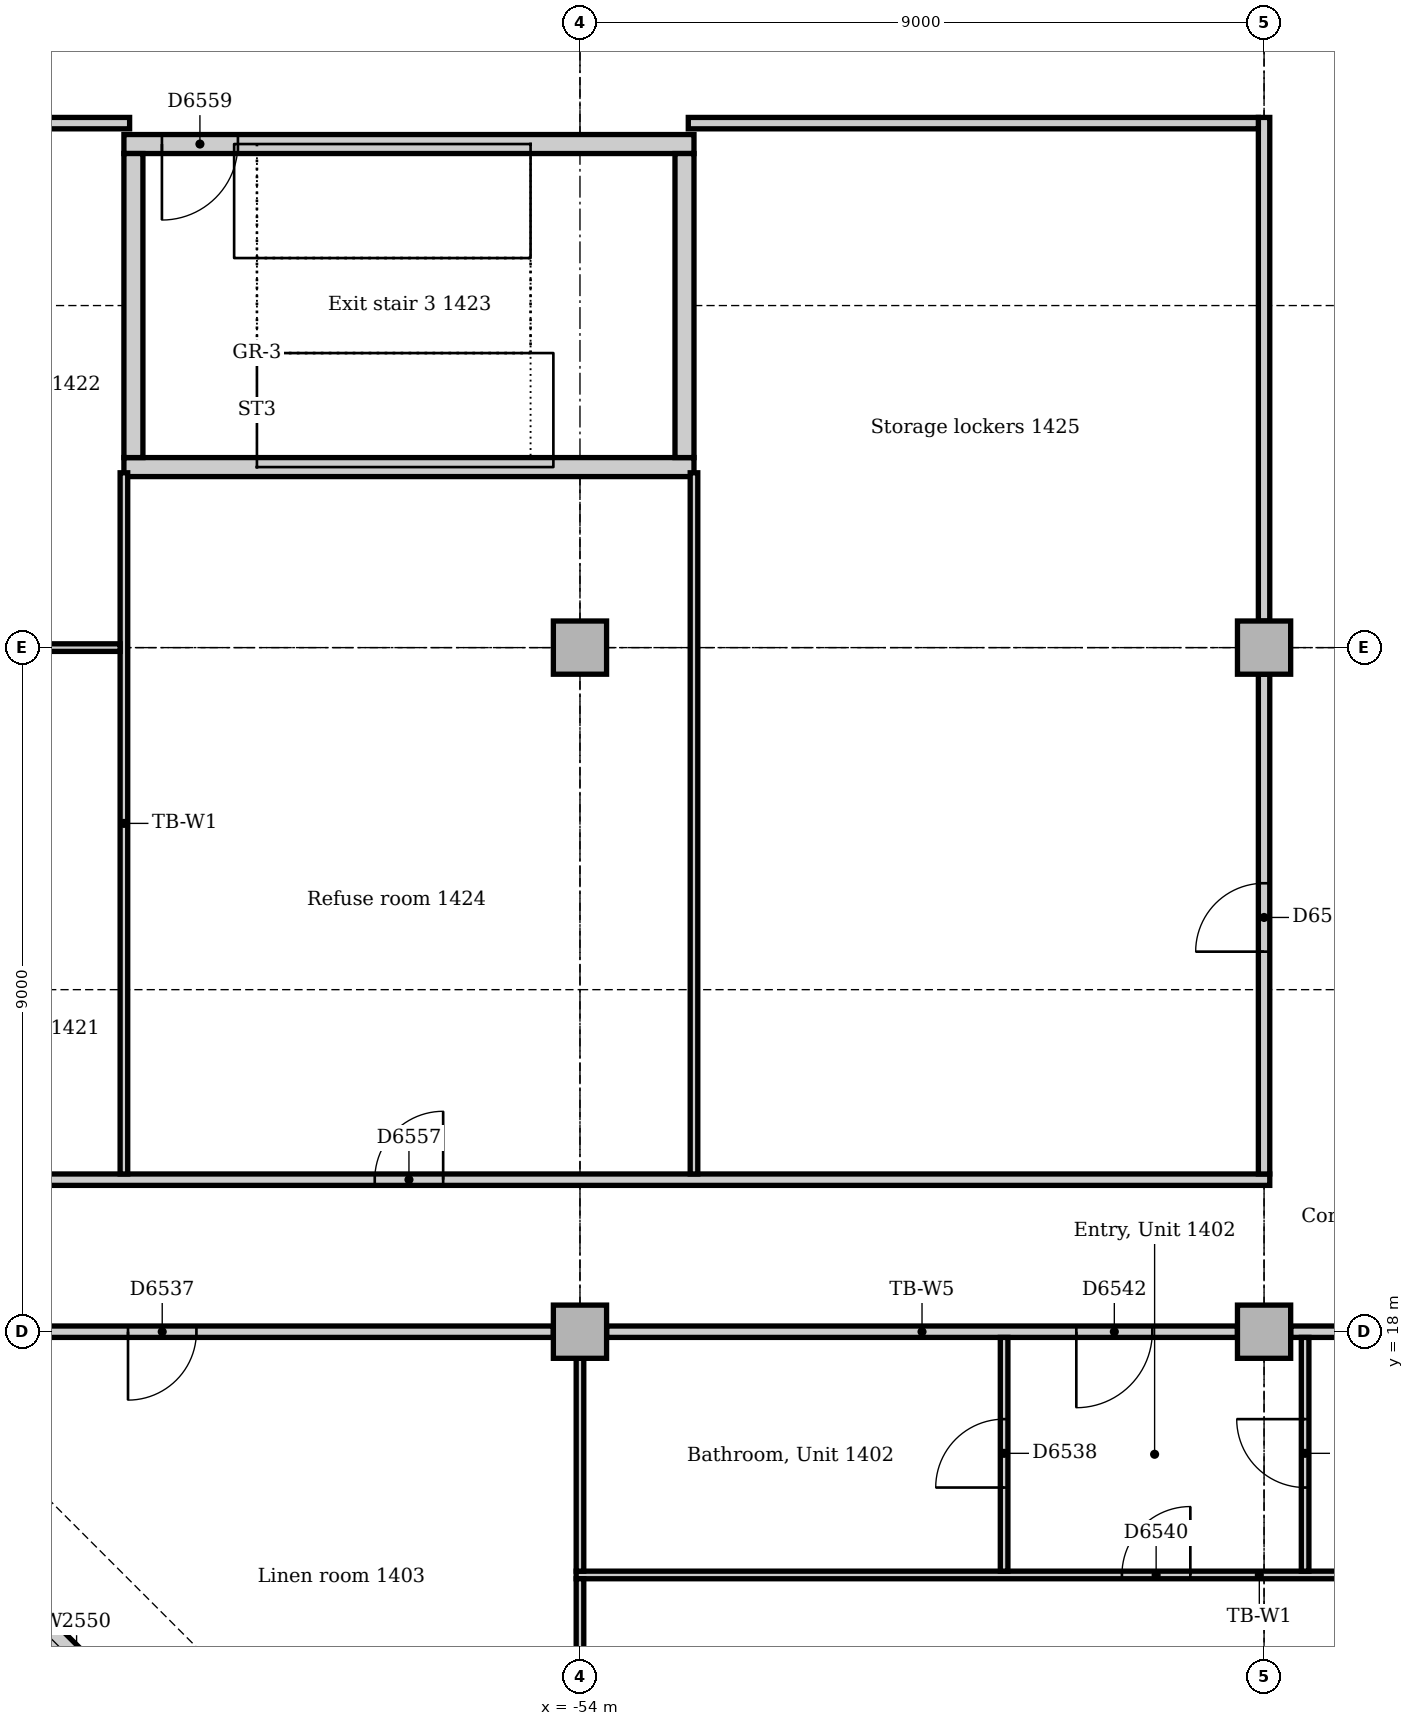
"""IFC4 building model, lengths in metres.
Left out: names, types, materials, properties, quantities, classifications, styles, units other than length and angle.
Written with IfcOpenShell. Run it as: python <this file> out.ifc"""

import sys

from ifc_helpers import new_model, si_unit, direction, frame, frame_2d, origin, origin_2d, place, context, subcontext, project, spatial, rectangle, extrude, element, fill, save


model = new_model("IFC4")
c1 = context("Model", 3, precision=1e-05, world=origin(), true_north=direction((0.0, 1.0)))
c2 = subcontext(c1, "Body", "Model", "MODEL_VIEW")
j1 = project(units=[si_unit("LENGTHUNIT", "METRE"), si_unit("PLANEANGLEUNIT", "RADIAN")], contexts=[c1])
p1 = place(None, origin())
s1 = spatial("IfcSite", under=j1, at=p1, CompositionType="ELEMENT")
p2 = place(p1, origin())
s2 = spatial("IfcBuilding", under=s1, at=p2, CompositionType="ELEMENT")
p3 = place(p2, frame((0.0, 0.0, 63.0)))
s3 = spatial("IfcBuildingStorey", under=s2, at=p3, CompositionType="ELEMENT", Elevation=63.0)
p4 = place(p3, frame((-60.0, 29.375, 0.0), z_axis=(0.0, 0.0, 1.0), x_axis=(1.0, 0.0, 0.0)))
e1 = element("IfcWall", 1, at=p4, inside=s3, PredefinedType="SOLIDWALL", context=c2, shape_type="SweptSolid", body=[
    extrude(rectangle(XDim=7.5, YDim=0.25, at=frame_2d((3.75, 0.0))), origin(), (0.0, 0.0, 1.0), 4.0),
])
p5 = place(p3, frame((-52.5, 33.625, 0.0), z_axis=(0.0, 0.0, 1.0), x_axis=(-1.0, 0.0, 0.0)))
e2 = element("IfcWall", 2, at=p5, inside=s3, PredefinedType="SOLIDWALL", context=c2, shape_type="SweptSolid", body=[
    extrude(rectangle(XDim=7.5, YDim=0.25, at=frame_2d((3.75, 0.0))), origin(), (0.0, 0.0, 1.0), 4.0),
])
p6 = place(p5, frame((6.0, 0.0, 0.0)))
e3 = element("IfcOpeningElement", 3, at=p6, cuts=e2, PredefinedType="OPENING", context=c2, shape_type="SweptSolid", body=[
    extrude(rectangle(XDim=1.0, YDim=2.1, at=frame_2d((0.5, 1.05))), frame((0.0, 0.135, 0.0), z_axis=(0.0, -1.0, 0.0), x_axis=(1.0, 0.0, 0.0)), (0.0, 0.0, 1.0), 0.27),
])
for number, where, z_axis, x_axis in (
    (4, (-52.625, 29.5, 0.0), (0.0, 0.0, 1.0), (0.0, 1.0, 0.0)),
    (5, (-59.875, 33.5, 0.0), (0.0, 0.0, 1.0), (0.0, -1.0, 0.0)),
):
    element("IfcWall", number, at=place(p3, frame(where, z_axis=z_axis, x_axis=x_axis)), inside=s3, PredefinedType="SOLIDWALL", context=c2, shape_type="SweptSolid", body=[
        extrude(rectangle(XDim=4.0, YDim=0.25, at=frame_2d((2.0, 0.0))), origin(), (0.0, 0.0, 1.0), 4.0),
    ])
for number, where, z_axis, x_axis in (
    (6, (-54.0, 18.0, 0.0), (0.0, 0.0, 1.0), (1.0, 0.0, 0.0)),
    (7, (-54.0, 27.0, 0.0), (0.0, 0.0, 1.0), (1.0, 0.0, 0.0)),
    (8, (-45.0, 18.0, 0.0), (0.0, 0.0, 1.0), (1.0, 0.0, 0.0)),
    (9, (-45.0, 27.0, 0.0), (0.0, 0.0, 1.0), (1.0, 0.0, 0.0)),
):
    element("IfcColumn", number, at=place(p3, frame(where, z_axis=z_axis, x_axis=x_axis)), inside=s3, PredefinedType="COLUMN", context=c2, shape_type="SweptSolid", body=[
        extrude(rectangle(XDim=0.7, YDim=0.7, at=origin_2d()), origin(), (0.0, 0.0, 1.0), 3.85),
    ])
p7 = place(p3, frame((-64.244, 17.249, 0.0), z_axis=(0.0, 0.0, 1.0), x_axis=(0.707106781187, -0.707106781187, 0.0)))
e10 = element("IfcWall", 10, at=p7, inside=s3, PredefinedType="STANDARD", context=c2, shape_type="SweptSolid", body=[
    extrude(rectangle(XDim=10.243, YDim=0.36, at=frame_2d((5.121, 0.0))), origin(), (0.0, 0.0, 1.0), 3.85),
])
p8 = place(p7, frame((3.471, 0.0, 0.9)))
e11 = element("IfcOpeningElement", 11, at=p8, cuts=e10, PredefinedType="OPENING", context=c2, shape_type="SweptSolid", body=[
    extrude(rectangle(XDim=3.3, YDim=1.6, at=frame_2d((1.65, 0.8))), frame((0.0, 0.19, 0.0), z_axis=(0.0, -1.0, 0.0), x_axis=(1.0, 0.0, 0.0)), (0.0, 0.0, 1.0), 0.38),
])
p9 = place(p3, frame((-44.65, 18.0, 0.0), z_axis=(0.0, 0.0, 1.0), x_axis=(1.0, 0.0, 0.0)))
e12 = element("IfcWall", 12, at=p9, inside=s3, PredefinedType="PARTITIONING", context=c2, shape_type="SweptSolid", body=[
    extrude(rectangle(XDim=8.3, YDim=0.15, at=frame_2d((4.15, 0.0))), origin(), (0.0, 0.0, 1.0), 3.158),
])
p10 = place(p3, frame((-53.65, 18.0, 0.0), z_axis=(0.0, 0.0, 1.0), x_axis=(1.0, 0.0, 0.0)))
e13 = element("IfcWall", 13, at=p10, inside=s3, PredefinedType="PARTITIONING", context=c2, shape_type="SweptSolid", body=[
    extrude(rectangle(XDim=8.3, YDim=0.15, at=frame_2d((4.15, 0.0))), origin(), (0.0, 0.0, 1.0), 3.158),
])
p11 = place(p10, frame((6.18, 0.0, 0.0)))
e14 = element("IfcOpeningElement", 14, at=p11, cuts=e13, PredefinedType="OPENING", context=c2, shape_type="SweptSolid", body=[
    extrude(rectangle(XDim=1.0, YDim=2.1, at=frame_2d((0.5, 1.05))), frame((0.0, 0.085, 0.0), z_axis=(0.0, -1.0, 0.0), x_axis=(1.0, 0.0, 0.0)), (0.0, 0.0, 1.0), 0.17),
])
p12 = place(p3, frame((-64.596, 18.0, 0.0), z_axis=(0.0, 0.0, 1.0), x_axis=(1.0, 0.0, 0.0)))
e15 = element("IfcWall", 15, at=p12, inside=s3, PredefinedType="PARTITIONING", context=c2, shape_type="SweptSolid", body=[
    extrude(rectangle(XDim=10.246, YDim=0.15, at=frame_2d((5.123, 0.0))), origin(), (0.0, 0.0, 1.0), 3.158),
])
p13 = place(p12, frame((4.65, 0.0, 0.0)))
e16 = element("IfcOpeningElement", 16, at=p13, cuts=e15, PredefinedType="OPENING", context=c2, shape_type="SweptSolid", body=[
    extrude(rectangle(XDim=0.9, YDim=2.1, at=frame_2d((0.45, 1.05))), frame((0.0, 0.085, 0.0), z_axis=(0.0, -1.0, 0.0), x_axis=(1.0, 0.0, 0.0)), (0.0, 0.0, 1.0), 0.17),
])
p14 = place(p3, frame((-64.89, 20.0, 0.0), z_axis=(0.0, 0.0, 1.0), x_axis=(1.0, 0.0, 0.0)))
e17 = element("IfcWall", 17, at=p14, inside=s3, PredefinedType="PARTITIONING", context=c2, shape_type="SweptSolid", body=[
    extrude(rectangle(XDim=19.965, YDim=0.15, at=frame_2d((9.982, 0.0))), origin(), (0.0, 0.0, 1.0), 3.85),
])
p15 = place(p14, frame((2.05, 0.0, 0.0)))
e18 = element("IfcOpeningElement", 18, at=p15, cuts=e17, PredefinedType="OPENING", context=c2, shape_type="SweptSolid", body=[
    extrude(rectangle(XDim=0.9, YDim=2.1, at=frame_2d((0.45, 1.05))), frame((0.0, 0.085, 0.0), z_axis=(0.0, -1.0, 0.0), x_axis=(1.0, 0.0, 0.0)), (0.0, 0.0, 1.0), 0.17),
])
p16 = place(p14, frame((8.19, 0.0, 0.0)))
e19 = element("IfcOpeningElement", 19, at=p16, cuts=e17, PredefinedType="OPENING", context=c2, shape_type="SweptSolid", body=[
    extrude(rectangle(XDim=0.9, YDim=2.1, at=frame_2d((0.45, 1.05))), frame((0.0, 0.085, 0.0), z_axis=(0.0, -1.0, 0.0), x_axis=(1.0, 0.0, 0.0)), (0.0, 0.0, 1.0), 0.17),
])
p17 = place(p3, frame((-45.0, 20.075, 0.0), z_axis=(0.0, 0.0, 1.0), x_axis=(0.0, 1.0, 0.0)))
e20 = element("IfcWall", 20, at=p17, inside=s3, PredefinedType="PARTITIONING", context=c2, shape_type="SweptSolid", body=[
    extrude(rectangle(XDim=6.575, YDim=0.15, at=frame_2d((3.288, 0.0))), origin(), (0.0, 0.0, 1.0), 3.256),
])
p18 = place(p17, frame((2.925, 0.0, 0.0)))
e21 = element("IfcOpeningElement", 21, at=p18, cuts=e20, PredefinedType="OPENING", context=c2, shape_type="SweptSolid", body=[
    extrude(rectangle(XDim=0.9, YDim=2.1, at=frame_2d((0.45, 1.05))), frame((0.0, 0.085, 0.0), z_axis=(0.0, -1.0, 0.0), x_axis=(1.0, 0.0, 0.0)), (0.0, 0.0, 1.0), 0.17),
])
p19 = place(p3, frame((-45.0, 27.35, 0.0), z_axis=(0.0, 0.0, 1.0), x_axis=(0.0, 1.0, 0.0)))
e22 = element("IfcWall", 22, at=p19, inside=s3, PredefinedType="PARTITIONING", context=c2, shape_type="SweptSolid", body=[
    extrude(rectangle(XDim=6.625, YDim=0.15, at=frame_2d((3.312, 0.0))), origin(), (0.0, 0.0, 1.0), 3.256),
])
p20 = place(p3, frame((-52.575, 33.9, 0.0), z_axis=(0.0, 0.0, 1.0), x_axis=(1.0, 0.0, 0.0)))
e23 = element("IfcWall", 23, at=p20, inside=s3, PredefinedType="PARTITIONING", context=c2, shape_type="SweptSolid", body=[
    extrude(rectangle(XDim=7.5, YDim=0.15, at=frame_2d((3.75, 0.0))), origin(), (0.0, 0.0, 1.0), 3.85),
])
p21 = place(p3, frame((-64.89, 33.9, 0.0), z_axis=(0.0, 0.0, 1.0), x_axis=(1.0, 0.0, 0.0)))
e24 = element("IfcWall", 24, at=p21, inside=s3, PredefinedType="PARTITIONING", context=c2, shape_type="SweptSolid", body=[
    extrude(rectangle(XDim=4.965, YDim=0.15, at=frame_2d((2.482, 0.0))), origin(), (0.0, 0.0, 1.0), 3.85),
])
p22 = place(p21, frame((2.05, 0.0, 0.0)))
e25 = element("IfcOpeningElement", 25, at=p22, cuts=e24, PredefinedType="OPENING", context=c2, shape_type="SweptSolid", body=[
    extrude(rectangle(XDim=0.9, YDim=2.1, at=frame_2d((0.45, 1.05))), frame((0.0, 0.085, 0.0), z_axis=(0.0, -1.0, 0.0), x_axis=(1.0, 0.0, 0.0)), (0.0, 0.0, 1.0), 0.17),
])
p23 = place(p3, frame((-54.05, 14.8, 0.0), z_axis=(0.0, 0.0, 1.0), x_axis=(1.0, 0.0, 0.0)))
e26 = element("IfcWall", 26, at=p23, inside=s3, PredefinedType="PARTITIONING", context=c2, shape_type="SweptSolid", body=[
    extrude(rectangle(XDim=17.975, YDim=0.1, at=frame_2d((8.988, 0.0))), origin(), (0.0, 0.0, 1.0), 3.85),
])
p24 = place(p23, frame((7.18, 0.0, 0.0)))
e27 = element("IfcOpeningElement", 27, at=p24, cuts=e26, PredefinedType="OPENING", context=c2, shape_type="SweptSolid", body=[
    extrude(rectangle(XDim=0.9, YDim=2.1, at=frame_2d((0.45, 1.05))), frame((0.0, 0.06, 0.0), z_axis=(0.0, -1.0, 0.0), x_axis=(1.0, 0.0, 0.0)), (0.0, 0.0, 1.0), 0.12),
])
for number, where, z_axis, x_axis in (
    (28, (-60.0, 20.075, 0.0), (0.0, 0.0, 1.0), (0.0, 1.0, 0.0)),
    (29, (-52.5, 20.075, 0.0), (0.0, 0.0, 1.0), (0.0, 1.0, 0.0)),
):
    element("IfcWall", number, at=place(p3, frame(where, z_axis=z_axis, x_axis=x_axis)), inside=s3, PredefinedType="PARTITIONING", context=c2, shape_type="SweptSolid", body=[
        extrude(rectangle(XDim=9.225, YDim=0.1, at=frame_2d((4.612, 0.0))), origin(), (0.0, 0.0, 1.0), 3.85),
    ])
p25 = place(p3, frame((-54.0, 9.36, 0.0), z_axis=(0.0, 0.0, 1.0), x_axis=(0.0, 1.0, 0.0)))
e30 = element("IfcWall", 30, at=p25, inside=s3, PredefinedType="PARTITIONING", context=c2, shape_type="SweptSolid", body=[
    extrude(rectangle(XDim=5.39, YDim=0.1, at=frame_2d((2.695, 0.0))), origin(), (0.0, 0.0, 1.0), 3.256),
])
p26 = place(p3, frame((-54.0, 14.85, 0.0), z_axis=(0.0, 0.0, 1.0), x_axis=(0.0, 1.0, 0.0)))
e31 = element("IfcWall", 31, at=p26, inside=s3, PredefinedType="PARTITIONING", context=c2, shape_type="SweptSolid", body=[
    extrude(rectangle(XDim=2.8, YDim=0.1, at=frame_2d((1.4, 0.0))), origin(), (0.0, 0.0, 1.0), 3.256),
])
p27 = place(p3, frame((-62.6, 27.0, 0.0), z_axis=(0.0, 0.0, 1.0), x_axis=(1.0, 0.0, 0.0)))
e32 = element("IfcWall", 32, at=p27, inside=s3, PredefinedType="PARTITIONING", context=c2, shape_type="SweptSolid", body=[
    extrude(rectangle(XDim=2.55, YDim=0.1, at=frame_2d((1.275, 0.0))), origin(), (0.0, 0.0, 1.0), 3.158),
])
p28 = place(p3, frame((-48.42, 14.85, 0.0), z_axis=(0.0, 0.0, 1.0), x_axis=(0.0, 1.0, 0.0)))
e33 = element("IfcWall", 33, at=p28, inside=s3, PredefinedType="PARTITIONING", context=c2, shape_type="SweptSolid", body=[
    extrude(rectangle(XDim=3.075, YDim=0.1, at=frame_2d((1.538, 0.0))), origin(), (0.0, 0.0, 1.0), 3.85),
])
p29 = place(p28, frame((1.1, 0.0, 0.0)))
e34 = element("IfcOpeningElement", 34, at=p29, cuts=e33, PredefinedType="OPENING", context=c2, shape_type="SweptSolid", body=[
    extrude(rectangle(XDim=0.9, YDim=2.1, at=frame_2d((0.45, 1.05))), frame((0.0, 0.06, 0.0), z_axis=(0.0, -1.0, 0.0), x_axis=(1.0, 0.0, 0.0)), (0.0, 0.0, 1.0), 0.12),
])
p30 = place(p3, frame((-44.46, 14.85, 0.0), z_axis=(0.0, 0.0, 1.0), x_axis=(0.0, 1.0, 0.0)))
e35 = element("IfcWall", 35, at=p30, inside=s3, PredefinedType="PARTITIONING", context=c2, shape_type="SweptSolid", body=[
    extrude(rectangle(XDim=3.075, YDim=0.1, at=frame_2d((1.538, 0.0))), origin(), (0.0, 0.0, 1.0), 3.85),
])
p31 = place(p30, frame((1.1, 0.0, 0.0)))
e36 = element("IfcOpeningElement", 36, at=p31, cuts=e35, PredefinedType="OPENING", context=c2, shape_type="SweptSolid", body=[
    extrude(rectangle(XDim=0.9, YDim=2.1, at=frame_2d((0.45, 1.05))), frame((0.0, 0.06, 0.0), z_axis=(0.0, -1.0, 0.0), x_axis=(1.0, 0.0, 0.0)), (0.0, 0.0, 1.0), 0.12),
])
p32 = place(p8, origin())
e37 = element("IfcWindow", 37, at=p32, inside=s3, PartitioningType="SINGLE_PANEL", PredefinedType="WINDOW", context=c2, shape_type="SweptSolid", body=[
    extrude(rectangle(XDim=3.3, YDim=1.6, at=frame_2d((1.65, 0.8))), frame((0.0, 0.13, 0.0), z_axis=(0.0, -1.0, 0.0), x_axis=(1.0, 0.0, 0.0)), (0.0, 0.0, 1.0), 0.06),
])
fill(e11, e37)
p33 = place(p13, frame((0.9, 0.0, 0.0), z_axis=(0.0, 0.0, 1.0), x_axis=(-1.0, 0.0, 0.0)))
e38 = element("IfcDoor", 38, at=p33, inside=s3, OperationType="SINGLE_SWING_RIGHT", PredefinedType="DOOR", context=c2, shape_type="SweptSolid", body=[
    extrude(rectangle(XDim=0.9, YDim=2.1, at=frame_2d((0.45, 1.05))), frame((0.0, 0.025, 0.0), z_axis=(0.0, -1.0, 0.0), x_axis=(1.0, 0.0, 0.0)), (0.0, 0.0, 1.0), 0.05),
])
fill(e16, e38)
p34 = place(p29, origin())
e39 = element("IfcDoor", 39, at=p34, inside=s3, OperationType="SINGLE_SWING_LEFT", PredefinedType="DOOR", context=c2, shape_type="SweptSolid", body=[
    extrude(rectangle(XDim=0.9, YDim=2.1, at=frame_2d((0.45, 1.05))), frame((0.0, 0.025, 0.0), z_axis=(0.0, -1.0, 0.0), x_axis=(1.0, 0.0, 0.0)), (0.0, 0.0, 1.0), 0.05),
])
fill(e34, e39)
p35 = place(p31, origin())
e40 = element("IfcDoor", 40, at=p35, inside=s3, OperationType="SINGLE_SWING_RIGHT", PredefinedType="DOOR", context=c2, shape_type="SweptSolid", body=[
    extrude(rectangle(XDim=0.9, YDim=2.1, at=frame_2d((0.45, 1.05))), frame((0.0, 0.025, 0.0), z_axis=(0.0, -1.0, 0.0), x_axis=(1.0, 0.0, 0.0)), (0.0, 0.0, 1.0), 0.05),
])
fill(e36, e40)
p36 = place(p24, origin())
e41 = element("IfcDoor", 41, at=p36, inside=s3, OperationType="SINGLE_SWING_RIGHT", PredefinedType="DOOR", context=c2, shape_type="SweptSolid", body=[
    extrude(rectangle(XDim=0.9, YDim=2.1, at=frame_2d((0.45, 1.05))), frame((0.0, 0.025, 0.0), z_axis=(0.0, -1.0, 0.0), x_axis=(1.0, 0.0, 0.0)), (0.0, 0.0, 1.0), 0.05),
])
fill(e27, e41)
p37 = place(p11, frame((1.0, 0.0, 0.0), z_axis=(0.0, 0.0, 1.0), x_axis=(-1.0, 0.0, 0.0)))
e42 = element("IfcDoor", 42, at=p37, inside=s3, OperationType="SINGLE_SWING_RIGHT", PredefinedType="DOOR", context=c2, shape_type="SweptSolid", body=[
    extrude(rectangle(XDim=1.0, YDim=2.1, at=frame_2d((0.5, 1.05))), frame((0.0, 0.025, 0.0), z_axis=(0.0, -1.0, 0.0), x_axis=(1.0, 0.0, 0.0)), (0.0, 0.0, 1.0), 0.05),
])
fill(e14, e42)
p38 = place(p16, origin())
e43 = element("IfcDoor", 43, at=p38, inside=s3, OperationType="SINGLE_SWING_RIGHT", PredefinedType="DOOR", context=c2, shape_type="SweptSolid", body=[
    extrude(rectangle(XDim=0.9, YDim=2.1, at=frame_2d((0.45, 1.05))), frame((0.0, 0.025, 0.0), z_axis=(0.0, -1.0, 0.0), x_axis=(1.0, 0.0, 0.0)), (0.0, 0.0, 1.0), 0.05),
])
fill(e19, e43)
p39 = place(p18, origin())
e44 = element("IfcDoor", 44, at=p39, inside=s3, OperationType="SINGLE_SWING_LEFT", PredefinedType="DOOR", context=c2, shape_type="SweptSolid", body=[
    extrude(rectangle(XDim=0.9, YDim=2.1, at=frame_2d((0.45, 1.05))), frame((0.0, 0.025, 0.0), z_axis=(0.0, -1.0, 0.0), x_axis=(1.0, 0.0, 0.0)), (0.0, 0.0, 1.0), 0.05),
])
fill(e21, e44)
p40 = place(p6, origin())
e45 = element("IfcDoor", 45, at=p40, inside=s3, OperationType="SINGLE_SWING_RIGHT", PredefinedType="DOOR", context=c2, shape_type="SweptSolid", body=[
    extrude(rectangle(XDim=1.0, YDim=2.1, at=frame_2d((0.5, 1.05))), frame((0.0, 0.025, 0.0), z_axis=(0.0, -1.0, 0.0), x_axis=(1.0, 0.0, 0.0)), (0.0, 0.0, 1.0), 0.05),
])
fill(e3, e45)
save(model, sys.argv[1])
